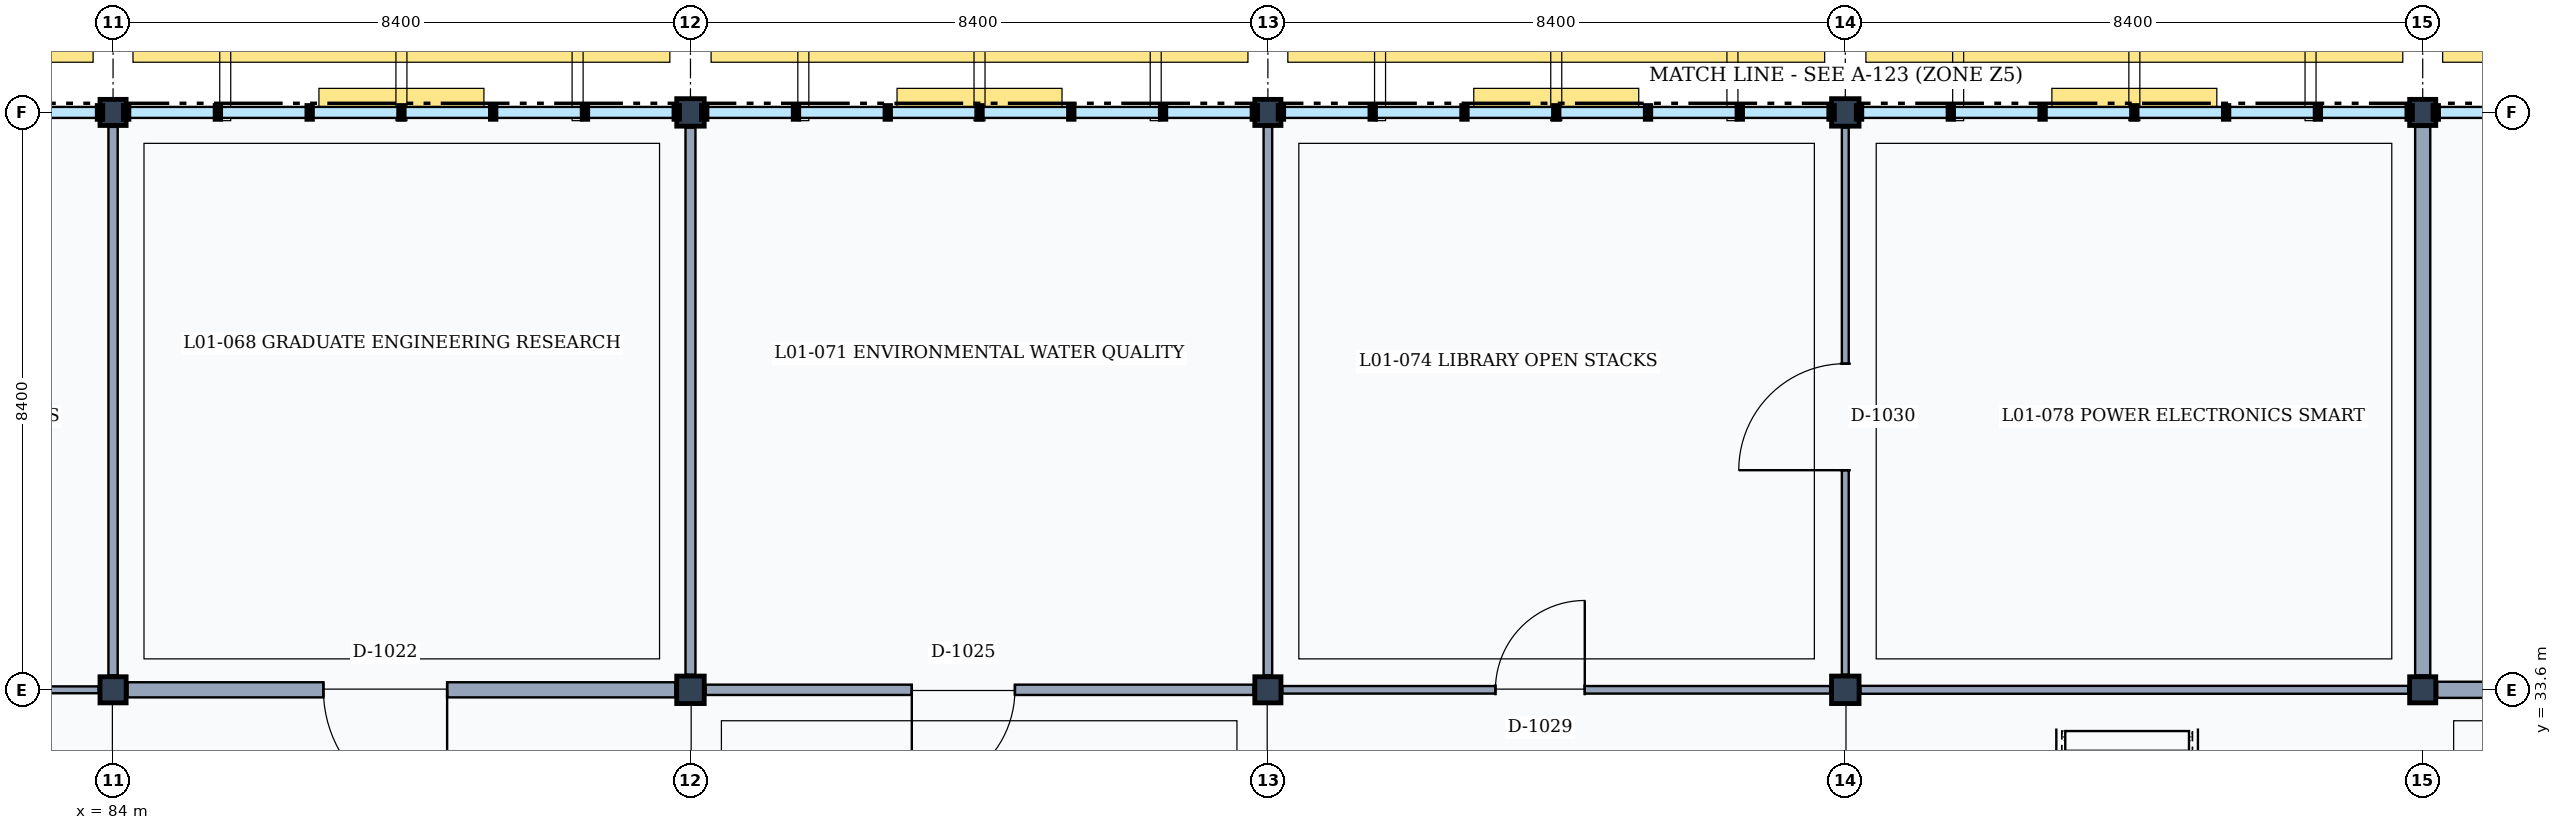
"""IFC4 building model, lengths in metres.
Left out: names, types, materials, properties, quantities, classifications, styles, units other than length and angle.
Written with IfcOpenShell. Run it as: python <this file> out.ifc"""

import sys

from ifc_helpers import new_model, si_unit, direction, frame, frame_2d, origin, origin_2d, place, context, subcontext, project, spatial, rectangle, extrude, element, fill, save


model = new_model("IFC4")
c1 = context("Model", 3, precision=1e-05, world=origin(), true_north=direction((0.0, 1.0)))
c2 = subcontext(c1, "Body", "Model", "MODEL_VIEW")
j1 = project(units=[si_unit("LENGTHUNIT", "METRE"), si_unit("PLANEANGLEUNIT", "RADIAN")], contexts=[c1])
p1 = place(None, origin())
s1 = spatial("IfcSite", under=j1, at=p1, CompositionType="ELEMENT")
p2 = place(p1, origin())
s2 = spatial("IfcBuilding", under=s1, at=p2, CompositionType="ELEMENT")
p3 = place(p2, frame((0.0, 0.0, 4.8)))
s3 = spatial("IfcBuildingStorey", under=s2, at=p3, CompositionType="ELEMENT", Elevation=4.8)
for number, where, z_axis, x_axis in (
    (1, (84.0, 33.6, 0.0), (0.0, 0.0, 1.0), (1.0, 0.0, 0.0)),
    (2, (84.0, 42.0, 0.0), (0.0, 0.0, 1.0), (1.0, 0.0, 0.0)),
):
    element("IfcColumn", number, at=place(p3, frame(where, z_axis=z_axis, x_axis=x_axis)), inside=s3, PredefinedType="COLUMN", context=c2, shape_type="SweptSolid", body=[
        extrude(rectangle(XDim=0.38, YDim=0.38, at=origin_2d()), origin(), (0.0, 0.0, 1.0), 4.8),
    ])
for number, where, z_axis, x_axis in (
    (3, (92.4, 33.6, 0.0), (0.0, 0.0, 1.0), (1.0, 0.0, 0.0)),
    (4, (92.4, 42.0, 0.0), (0.0, 0.0, 1.0), (1.0, 0.0, 0.0)),
):
    element("IfcColumn", number, at=place(p3, frame(where, z_axis=z_axis, x_axis=x_axis)), inside=s3, PredefinedType="COLUMN", context=c2, shape_type="SweptSolid", body=[
        extrude(rectangle(XDim=0.4, YDim=0.4, at=origin_2d()), origin(), (0.0, 0.0, 1.0), 4.8),
    ])
for number, where, z_axis, x_axis in (
    (5, (100.8, 33.6, 0.0), (0.0, 0.0, 1.0), (1.0, 0.0, 0.0)),
    (6, (100.8, 42.0, 0.0), (0.0, 0.0, 1.0), (1.0, 0.0, 0.0)),
):
    element("IfcColumn", number, at=place(p3, frame(where, z_axis=z_axis, x_axis=x_axis)), inside=s3, PredefinedType="COLUMN", context=c2, shape_type="SweptSolid", body=[
        extrude(rectangle(XDim=0.38, YDim=0.38, at=origin_2d()), origin(), (0.0, 0.0, 1.0), 4.8),
    ])
for number, where, z_axis, x_axis in (
    (7, (109.2, 33.6, 0.0), (0.0, 0.0, 1.0), (1.0, 0.0, 0.0)),
    (8, (109.2, 42.0, 0.0), (0.0, 0.0, 1.0), (1.0, 0.0, 0.0)),
):
    element("IfcColumn", number, at=place(p3, frame(where, z_axis=z_axis, x_axis=x_axis)), inside=s3, PredefinedType="COLUMN", context=c2, shape_type="SweptSolid", body=[
        extrude(rectangle(XDim=0.4, YDim=0.4, at=origin_2d()), origin(), (0.0, 0.0, 1.0), 4.8),
    ])
for number, where, z_axis, x_axis in (
    (9, (117.6, 33.6, 0.0), (0.0, 0.0, 1.0), (1.0, 0.0, 0.0)),
    (10, (117.6, 42.0, 0.0), (0.0, 0.0, 1.0), (1.0, 0.0, 0.0)),
):
    element("IfcColumn", number, at=place(p3, frame(where, z_axis=z_axis, x_axis=x_axis)), inside=s3, PredefinedType="COLUMN", context=c2, shape_type="SweptSolid", body=[
        extrude(rectangle(XDim=0.38, YDim=0.38, at=origin_2d()), origin(), (0.0, 0.0, 1.0), 4.8),
    ])
p4 = place(p3, frame((75.82, 33.6, 0.0), z_axis=(0.0, 0.0, 1.0), x_axis=(1.0, 0.0, 0.0)))
e11 = element("IfcWall", 11, at=p4, inside=s3, PredefinedType="MOVABLE", context=c2, shape_type="SweptSolid", body=[
    extrude(rectangle(XDim=7.97, YDim=0.1, at=frame_2d((3.985, 0.0))), origin(), (0.0, 0.0, 1.0), 3.92),
])
p5 = place(p3, frame((84.0, 33.81, 0.0), z_axis=(0.0, 0.0, 1.0), x_axis=(0.0, 1.0, 0.0)))
e12 = element("IfcWall", 12, at=p5, inside=s3, PredefinedType="PARTITIONING", context=c2, shape_type="SweptSolid", body=[
    extrude(rectangle(XDim=7.98, YDim=0.135, at=frame_2d((3.99, 0.0))), origin(), (0.0, 0.0, 1.0), 3.92),
])
p6 = place(p3, frame((84.21, 33.6, 0.0), z_axis=(0.0, 0.0, 1.0), x_axis=(1.0, 0.0, 0.0)))
e13 = element("IfcWall", 13, at=p6, inside=s3, PredefinedType="PARTITIONING", context=c2, shape_type="SweptSolid", body=[
    extrude(rectangle(XDim=7.97, YDim=0.22, at=frame_2d((3.985, 0.0))), origin(), (0.0, 0.0, 1.0), 3.92),
])
p7 = place(p6, frame((2.85, 0.0, 0.0)))
e14 = element("IfcOpeningElement", 14, at=p7, cuts=e13, PredefinedType="OPENING", context=c2, shape_type="SweptSolid", body=[
    extrude(rectangle(XDim=1.8, YDim=2.3, at=frame_2d((0.9, 1.15))), frame((0.0, 0.12, 0.0), z_axis=(0.0, -1.0, 0.0), x_axis=(1.0, 0.0, 0.0)), (0.0, 0.0, 1.0), 0.24),
])
p8 = place(p3, frame((92.4, 33.82, 0.0), z_axis=(0.0, 0.0, 1.0), x_axis=(0.0, 1.0, 0.0)))
e15 = element("IfcWall", 15, at=p8, inside=s3, PredefinedType="PARTITIONING", context=c2, shape_type="SweptSolid", body=[
    extrude(rectangle(XDim=7.96, YDim=0.145, at=frame_2d((3.98, 0.0))), origin(), (0.0, 0.0, 1.0), 3.92),
])
p9 = place(p3, frame((92.62, 33.6, 0.0), z_axis=(0.0, 0.0, 1.0), x_axis=(1.0, 0.0, 0.0)))
e16 = element("IfcWall", 16, at=p9, inside=s3, PredefinedType="PARTITIONING", context=c2, shape_type="SweptSolid", body=[
    extrude(rectangle(XDim=7.97, YDim=0.15, at=frame_2d((3.985, 0.0))), origin(), (0.0, 0.0, 1.0), 3.92),
])
p10 = place(p9, frame((3.0, 0.0, 0.0)))
e17 = element("IfcOpeningElement", 17, at=p10, cuts=e16, PredefinedType="OPENING", context=c2, shape_type="SweptSolid", body=[
    extrude(rectangle(XDim=1.5, YDim=2.3, at=frame_2d((0.75, 1.15))), frame((0.0, 0.085, 0.0), z_axis=(0.0, -1.0, 0.0), x_axis=(1.0, 0.0, 0.0)), (0.0, 0.0, 1.0), 0.17),
])
p11 = place(p3, frame((100.8, 33.81, 0.0), z_axis=(0.0, 0.0, 1.0), x_axis=(0.0, 1.0, 0.0)))
e18 = element("IfcWall", 18, at=p11, inside=s3, PredefinedType="PARTITIONING", context=c2, shape_type="SweptSolid", body=[
    extrude(rectangle(XDim=7.98, YDim=0.125, at=frame_2d((3.99, 0.0))), origin(), (0.0, 0.0, 1.0), 3.92),
])
p12 = place(p3, frame((101.01, 33.6, 0.0), z_axis=(0.0, 0.0, 1.0), x_axis=(1.0, 0.0, 0.0)))
e19 = element("IfcWall", 19, at=p12, inside=s3, PredefinedType="PARTITIONING", context=c2, shape_type="SweptSolid", body=[
    extrude(rectangle(XDim=7.97, YDim=0.11, at=frame_2d((3.985, 0.0))), origin(), (0.0, 0.0, 1.0), 3.92),
])
p13 = place(p12, frame((3.1, 0.0, 0.0)))
e20 = element("IfcOpeningElement", 20, at=p13, cuts=e19, PredefinedType="OPENING", context=c2, shape_type="SweptSolid", body=[
    extrude(rectangle(XDim=1.3, YDim=2.2, at=frame_2d((0.65, 1.1))), frame((0.0, 0.065, 0.0), z_axis=(0.0, -1.0, 0.0), x_axis=(1.0, 0.0, 0.0)), (0.0, 0.0, 1.0), 0.13),
])
p14 = place(p3, frame((109.2, 33.82, 0.0), z_axis=(0.0, 0.0, 1.0), x_axis=(0.0, 1.0, 0.0)))
e21 = element("IfcWall", 21, at=p14, inside=s3, PredefinedType="MOVABLE", context=c2, shape_type="SweptSolid", body=[
    extrude(rectangle(XDim=7.96, YDim=0.1, at=frame_2d((3.98, 0.0))), origin(), (0.0, 0.0, 1.0), 3.92),
])
p15 = place(p14, frame((2.975, 0.0, 0.0)))
e22 = element("IfcOpeningElement", 22, at=p15, cuts=e21, PredefinedType="OPENING", context=c2, shape_type="SweptSolid", body=[
    extrude(rectangle(XDim=1.55, YDim=2.35, at=frame_2d((0.775, 1.175))), frame((0.0, 0.06, 0.0), z_axis=(0.0, -1.0, 0.0), x_axis=(1.0, 0.0, 0.0)), (0.0, 0.0, 1.0), 0.12),
])
p16 = place(p3, frame((109.42, 33.6, 0.0), z_axis=(0.0, 0.0, 1.0), x_axis=(1.0, 0.0, 0.0)))
e23 = element("IfcWall", 23, at=p16, inside=s3, PredefinedType="PARTITIONING", context=c2, shape_type="SweptSolid", body=[
    extrude(rectangle(XDim=7.97, YDim=0.115, at=frame_2d((3.985, 0.0))), origin(), (0.0, 0.0, 1.0), 3.92),
])
p17 = place(p3, frame((117.6, 33.81, 0.0), z_axis=(0.0, 0.0, 1.0), x_axis=(0.0, 1.0, 0.0)))
e24 = element("IfcWall", 24, at=p17, inside=s3, PredefinedType="PARTITIONING", context=c2, shape_type="SweptSolid", body=[
    extrude(rectangle(XDim=7.98, YDim=0.22, at=frame_2d((3.99, 0.0))), origin(), (0.0, 0.0, 1.0), 3.92),
])
p18 = place(p3, frame((117.81, 33.6, 0.0), z_axis=(0.0, 0.0, 1.0), x_axis=(1.0, 0.0, 0.0)))
e25 = element("IfcWall", 25, at=p18, inside=s3, PredefinedType="PARTITIONING", context=c2, shape_type="SweptSolid", body=[
    extrude(rectangle(XDim=7.97, YDim=0.235, at=frame_2d((3.985, 0.0))), origin(), (0.0, 0.0, 1.0), 3.89),
])
p19 = place(p18, frame((3.125, 0.0, 0.0)))
e26 = element("IfcOpeningElement", 26, at=p19, cuts=e25, PredefinedType="OPENING", context=c2, shape_type="SweptSolid", body=[
    extrude(rectangle(XDim=1.25, YDim=2.3, at=frame_2d((0.625, 1.15))), frame((0.0, 0.127, 0.0), z_axis=(0.0, -1.0, 0.0), x_axis=(1.0, 0.0, 0.0)), (0.0, 0.0, 1.0), 0.255),
])
p20 = place(p7, frame((1.8, 0.0, 0.0), z_axis=(0.0, 0.0, 1.0), x_axis=(-1.0, 0.0, 0.0)))
e27 = element("IfcDoor", 27, at=p20, inside=s3, OperationType="SINGLE_SWING_LEFT", PredefinedType="DOOR", context=c2, shape_type="SweptSolid", body=[
    extrude(rectangle(XDim=1.8, YDim=2.3, at=frame_2d((0.9, 1.15))), frame((0.0, 0.025, 0.0), z_axis=(0.0, -1.0, 0.0), x_axis=(1.0, 0.0, 0.0)), (0.0, 0.0, 1.0), 0.05),
])
fill(e14, e27)
p21 = place(p10, frame((1.5, 0.0, 0.0), z_axis=(0.0, 0.0, 1.0), x_axis=(-1.0, 0.0, 0.0)))
e28 = element("IfcDoor", 28, at=p21, inside=s3, OperationType="SINGLE_SWING_RIGHT", PredefinedType="DOOR", context=c2, shape_type="SweptSolid", body=[
    extrude(rectangle(XDim=1.5, YDim=2.3, at=frame_2d((0.75, 1.15))), frame((0.0, 0.025, 0.0), z_axis=(0.0, -1.0, 0.0), x_axis=(1.0, 0.0, 0.0)), (0.0, 0.0, 1.0), 0.05),
])
fill(e17, e28)
p22 = place(p13, origin())
e29 = element("IfcDoor", 29, at=p22, inside=s3, OperationType="SINGLE_SWING_RIGHT", PredefinedType="DOOR", context=c2, shape_type="SweptSolid", body=[
    extrude(rectangle(XDim=1.3, YDim=2.2, at=frame_2d((0.65, 1.1))), frame((0.0, 0.025, 0.0), z_axis=(0.0, -1.0, 0.0), x_axis=(1.0, 0.0, 0.0)), (0.0, 0.0, 1.0), 0.05),
])
fill(e20, e29)
p23 = place(p15, origin())
e30 = element("IfcDoor", 30, at=p23, inside=s3, OperationType="SINGLE_SWING_LEFT", PredefinedType="DOOR", context=c2, shape_type="SweptSolid", body=[
    extrude(rectangle(XDim=1.55, YDim=2.35, at=frame_2d((0.775, 1.175))), frame((0.0, 0.025, 0.0), z_axis=(0.0, -1.0, 0.0), x_axis=(1.0, 0.0, 0.0)), (0.0, 0.0, 1.0), 0.05),
])
fill(e22, e30)
save(model, sys.argv[1])
